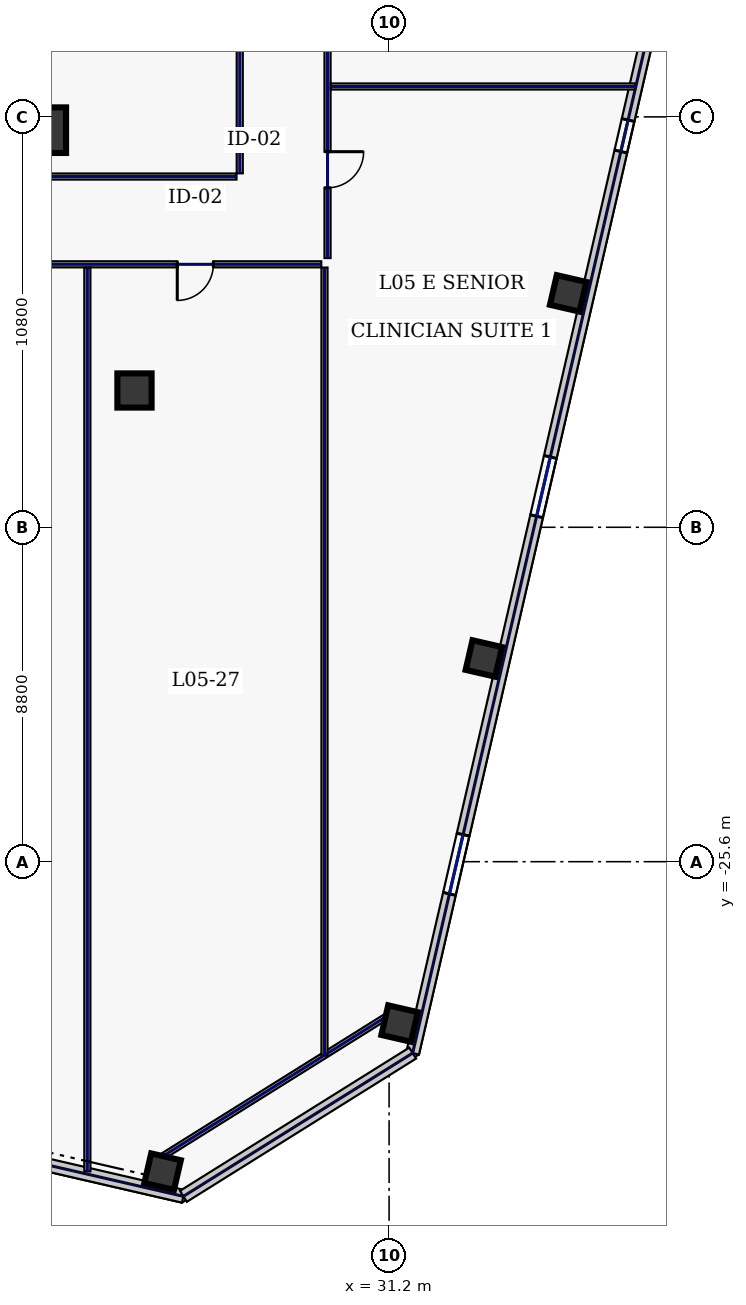
"""IFC4 building model, lengths in metres.
Left out: names, types, materials, properties, quantities, classifications, styles, units other than length and angle.
Written with IfcOpenShell. Run it as: python <this file> out.ifc"""

import sys

from ifc_helpers import new_model, si_unit, direction, frame, frame_2d, origin, origin_2d, place, context, subcontext, project, spatial, rectangle, hollow_rectangle, extrude, element, fill, save


model = new_model("IFC4")
c1 = context("Model", 3, precision=1e-05, world=origin(), true_north=direction((0.0, 1.0)))
c2 = subcontext(c1, "Body", "Model", "MODEL_VIEW")
j1 = project(units=[si_unit("LENGTHUNIT", "METRE"), si_unit("PLANEANGLEUNIT", "RADIAN")], contexts=[c1])
p1 = place(None, origin())
s1 = spatial("IfcSite", under=j1, at=p1, CompositionType="ELEMENT")
p2 = place(p1, origin())
s2 = spatial("IfcBuilding", under=s1, at=p2, CompositionType="ELEMENT")
p3 = place(p2, frame((0.0, 0.0, 28.4)))
s3 = spatial("IfcBuildingStorey", under=s2, at=p3, CompositionType="ELEMENT", Elevation=28.4)
p4 = place(p3, frame((22.1, -6.35, 0.0), z_axis=(0.0, 0.0, 1.0), x_axis=(1.0, 0.0, 0.0)))
e1 = element("IfcColumn", 1, at=p4, inside=s3, PredefinedType="COLUMN", context=c2, shape_type="SweptSolid", body=[
    extrude(hollow_rectangle(XDim=1.2, YDim=1.2, WallThickness=0.05, at=origin_2d()), origin(), (0.0, 0.0, 1.0), 4.68),
])
p5 = place(p3, frame((24.5, -13.2, 0.0), z_axis=(0.0, 0.0, 1.0), x_axis=(1.0, 0.0, 0.0)))
e2 = element("IfcColumn", 2, at=p5, inside=s3, PredefinedType="COLUMN", context=c2, shape_type="SweptSolid", body=[
    extrude(hollow_rectangle(XDim=0.9, YDim=0.9, WallThickness=0.04, at=origin_2d()), origin(), (0.0, 0.0, 1.0), 4.68),
])
for number, where, z_axis, x_axis in (
    (3, (25.24, -33.757, 0.0), (0.0, 0.0, 1.0), (0.974, -0.225, 0.0)),
    (4, (31.476, -29.86, 0.0), (0.0, 0.0, 1.0), (0.974, -0.225, 0.0)),
    (5, (33.694, -20.252, 0.0), (0.0, 0.0, 1.0), (0.974, -0.225, 0.0)),
    (6, (35.912, -10.645, 0.0), (0.0, 0.0, 1.0), (0.974, -0.225, 0.0)),
):
    element("IfcColumn", number, at=place(p3, frame(where, z_axis=z_axis, x_axis=x_axis)), inside=s3, PredefinedType="COLUMN", context=c2, shape_type="SweptSolid", body=[
        extrude(hollow_rectangle(XDim=0.8, YDim=0.8, WallThickness=0.036, at=origin_2d()), origin(), (0.0, 0.0, 1.0), 4.68),
    ])
p6 = place(p3, frame((3.717, -29.311, 0.0), z_axis=(0.0, 0.0, 1.0), x_axis=(0.97436993772, -0.224951604723, 0.0)))
e7 = element("IfcWall", 7, at=p6, inside=s3, PredefinedType="STANDARD", context=c2, shape_type="SweptSolid", body=[
    extrude(rectangle(XDim=22.651, YDim=0.34, at=frame_2d((11.326, 0.0))), origin(), (0.0, 0.0, 1.0), 4.68),
])
p7 = place(p6, frame((3.656, 0.0, 0.85)))
e8 = element("IfcOpeningElement", 8, at=p7, cuts=e7, PredefinedType="OPENING", context=c2, shape_type="SweptSolid", body=[
    extrude(rectangle(XDim=2.9, YDim=2.3, at=frame_2d((1.45, 1.15))), frame((0.0, 0.18, 0.0), z_axis=(0.0, -1.0, 0.0), x_axis=(1.0, 0.0, 0.0)), (0.0, 0.0, 1.0), 0.36),
])
p8 = place(p6, frame((8.791, 0.0, 0.22)))
e9 = element("IfcOpeningElement", 9, at=p8, cuts=e7, PredefinedType="OPENING", context=c2, shape_type="SweptSolid", body=[
    extrude(rectangle(XDim=1.6, YDim=1.2, at=frame_2d((0.8, 0.6))), frame((0.0, 0.18, 0.0), z_axis=(0.0, -1.0, 0.0), x_axis=(1.0, 0.0, 0.0)), (0.0, 0.0, 1.0), 0.36),
])
p9 = place(p6, frame((13.405, 0.0, 0.85)))
e10 = element("IfcOpeningElement", 10, at=p9, cuts=e7, PredefinedType="OPENING", context=c2, shape_type="SweptSolid", body=[
    extrude(rectangle(XDim=2.9, YDim=2.3, at=frame_2d((1.45, 1.15))), frame((0.0, 0.18, 0.0), z_axis=(0.0, -1.0, 0.0), x_axis=(1.0, 0.0, 0.0)), (0.0, 0.0, 1.0), 0.36),
])
p10 = place(p6, frame((17.889, 0.0, 0.85)))
e11 = element("IfcOpeningElement", 11, at=p10, cuts=e7, PredefinedType="OPENING", context=c2, shape_type="SweptSolid", body=[
    extrude(rectangle(XDim=0.85, YDim=1.85, at=frame_2d((0.425, 0.925))), frame((0.0, 0.18, 0.0), z_axis=(0.0, -1.0, 0.0), x_axis=(1.0, 0.0, 0.0)), (0.0, 0.0, 1.0), 0.36),
])
p11 = place(p3, frame((31.82, -30.637, 0.0), z_axis=(0.0, 0.0, 1.0), x_axis=(0.224949969076, 0.974370315338, 0.0)))
e12 = element("IfcWall", 12, at=p11, inside=s3, PredefinedType="STANDARD", context=c2, shape_type="SweptSolid", body=[
    extrude(rectangle(XDim=40.8, YDim=0.34, at=frame_2d((20.4, 0.0))), origin(), (0.0, 0.0, 1.0), 4.68),
])
p12 = place(p11, frame((4.3, 0.0, 0.58)))
e13 = element("IfcOpeningElement", 13, at=p12, cuts=e12, PredefinedType="OPENING", context=c2, shape_type="SweptSolid", body=[
    extrude(rectangle(XDim=1.6, YDim=2.3, at=frame_2d((0.8, 1.15))), frame((0.0, 0.18, 0.0), z_axis=(0.0, -1.0, 0.0), x_axis=(1.0, 0.0, 0.0)), (0.0, 0.0, 1.0), 0.36),
])
p13 = place(p11, frame((14.5, 0.0, 0.58)))
e14 = element("IfcOpeningElement", 14, at=p13, cuts=e12, PredefinedType="OPENING", context=c2, shape_type="SweptSolid", body=[
    extrude(rectangle(XDim=1.6, YDim=2.3, at=frame_2d((0.8, 1.15))), frame((0.0, 0.18, 0.0), z_axis=(0.0, -1.0, 0.0), x_axis=(1.0, 0.0, 0.0)), (0.0, 0.0, 1.0), 0.36),
])
p14 = place(p11, frame((24.35, 0.0, 0.75)))
e15 = element("IfcOpeningElement", 15, at=p14, cuts=e12, PredefinedType="OPENING", context=c2, shape_type="SweptSolid", body=[
    extrude(rectangle(XDim=0.85, YDim=1.85, at=frame_2d((0.425, 0.925))), frame((0.0, 0.18, 0.0), z_axis=(0.0, -1.0, 0.0), x_axis=(1.0, 0.0, 0.0)), (0.0, 0.0, 1.0), 0.36),
])
p15 = place(p11, frame((34.55, 0.0, 0.75)))
e16 = element("IfcOpeningElement", 16, at=p15, cuts=e12, PredefinedType="OPENING", context=c2, shape_type="SweptSolid", body=[
    extrude(rectangle(XDim=0.85, YDim=1.85, at=frame_2d((0.425, 0.925))), frame((0.0, 0.18, 0.0), z_axis=(0.0, -1.0, 0.0), x_axis=(1.0, 0.0, 0.0)), (0.0, 0.0, 1.0), 0.36),
])
p16 = place(p3, frame((25.788, -34.406, 0.0), z_axis=(0.0, 0.0, 1.0), x_axis=(0.848046504656, 0.529921811158, 0.0)))
e17 = element("IfcWall", 17, at=p16, inside=s3, PredefinedType="STANDARD", context=c2, shape_type="SweptSolid", body=[
    extrude(rectangle(XDim=7.113, YDim=0.34, at=frame_2d((3.557, 0.0))), origin(), (0.0, 0.0, 1.0), 4.68),
])
p17 = place(p3, frame((25.06, -33.468, 0.0), z_axis=(0.0, 0.0, 1.0), x_axis=(0.848043064089, 0.529927317139, 0.0)))
e18 = element("IfcWall", 18, at=p17, inside=s3, PredefinedType="PARTITIONING", context=c2, shape_type="SweptSolid", body=[
    extrude(rectangle(XDim=7.354, YDim=0.16, at=frame_2d((3.677, 0.0))), origin(), (0.0, 0.0, 1.0), 4.68),
])
p18 = place(p3, frame((29.58, 9.715, 0.0), z_axis=(0.0, 0.0, 1.0), x_axis=(0.0, -1.0, 0.0)))
e19 = element("IfcWall", 19, at=p18, inside=s3, PredefinedType="PARTITIONING", context=c2, shape_type="SweptSolid", body=[
    extrude(rectangle(XDim=19.43, YDim=0.16, at=frame_2d((9.715, 0.0))), origin(), (0.0, 0.0, 1.0), 4.68),
])
p19 = place(p18, frame((16.631, 0.0, 0.0)))
e20 = element("IfcOpeningElement", 20, at=p19, cuts=e19, PredefinedType="OPENING", context=c2, shape_type="SweptSolid", body=[
    extrude(rectangle(XDim=0.95, YDim=2.2, at=frame_2d((0.475, 1.1))), frame((0.0, 0.09, 0.0), z_axis=(0.0, -1.0, 0.0), x_axis=(1.0, 0.0, 0.0)), (0.0, 0.0, 1.0), 0.18),
])
p20 = place(p18, frame((11.925, 0.0, 0.0)))
e21 = element("IfcOpeningElement", 21, at=p20, cuts=e19, PredefinedType="OPENING", context=c2, shape_type="SweptSolid", body=[
    extrude(rectangle(XDim=0.95, YDim=2.2, at=frame_2d((0.475, 1.1))), frame((0.0, 0.09, 0.0), z_axis=(0.0, -1.0, 0.0), x_axis=(1.0, 0.0, 0.0)), (0.0, 0.0, 1.0), 0.18),
])
p21 = place(p18, frame((6.725, 0.0, 0.0)))
e22 = element("IfcOpeningElement", 22, at=p21, cuts=e19, PredefinedType="OPENING", context=c2, shape_type="SweptSolid", body=[
    extrude(rectangle(XDim=0.95, YDim=2.2, at=frame_2d((0.475, 1.1))), frame((0.0, 0.09, 0.0), z_axis=(0.0, -1.0, 0.0), x_axis=(1.0, 0.0, 0.0)), (0.0, 0.0, 1.0), 0.18),
])
p22 = place(p18, frame((2.019, 0.0, 0.0)))
e23 = element("IfcOpeningElement", 23, at=p22, cuts=e19, PredefinedType="OPENING", context=c2, shape_type="SweptSolid", body=[
    extrude(rectangle(XDim=0.95, YDim=2.2, at=frame_2d((0.475, 1.1))), frame((0.0, 0.09, 0.0), z_axis=(0.0, -1.0, 0.0), x_axis=(1.0, 0.0, 0.0)), (0.0, 0.0, 1.0), 0.18),
])
p23 = place(p3, frame((29.415, -9.88, 0.0), z_axis=(0.0, 0.0, 1.0), x_axis=(-1.0, 0.0, 0.0)))
e24 = element("IfcWall", 24, at=p23, inside=s3, PredefinedType="PARTITIONING", context=c2, shape_type="SweptSolid", body=[
    extrude(rectangle(XDim=22.5, YDim=0.16, at=frame_2d((11.25, 0.0))), origin(), (0.0, 0.0, 1.0), 4.68),
])
p24 = place(p23, frame((15.265, 0.0, 0.0)))
e25 = element("IfcOpeningElement", 25, at=p24, cuts=e24, PredefinedType="OPENING", context=c2, shape_type="SweptSolid", body=[
    extrude(rectangle(XDim=0.95, YDim=2.2, at=frame_2d((0.475, 1.1))), frame((0.0, 0.09, 0.0), z_axis=(0.0, -1.0, 0.0), x_axis=(1.0, 0.0, 0.0)), (0.0, 0.0, 1.0), 0.18),
])
p25 = place(p23, frame((9.335, 0.0, 0.0)))
e26 = element("IfcOpeningElement", 26, at=p25, cuts=e24, PredefinedType="OPENING", context=c2, shape_type="SweptSolid", body=[
    extrude(rectangle(XDim=1.05, YDim=2.2, at=frame_2d((0.525, 1.1))), frame((0.0, 0.09, 0.0), z_axis=(0.0, -1.0, 0.0), x_axis=(1.0, 0.0, 0.0)), (0.0, 0.0, 1.0), 0.18),
])
p26 = place(p23, frame((2.839, 0.0, 0.0)))
e27 = element("IfcOpeningElement", 27, at=p26, cuts=e24, PredefinedType="OPENING", context=c2, shape_type="SweptSolid", body=[
    extrude(rectangle(XDim=0.95, YDim=2.2, at=frame_2d((0.475, 1.1))), frame((0.0, 0.09, 0.0), z_axis=(0.0, -1.0, 0.0), x_axis=(1.0, 0.0, 0.0)), (0.0, 0.0, 1.0), 0.18),
])
p27 = place(p3, frame((10.665, -7.57, 0.0), z_axis=(0.0, 0.0, 1.0), x_axis=(1.0, 0.0, 0.0)))
e28 = element("IfcWall", 28, at=p27, inside=s3, PredefinedType="PARTITIONING", context=c2, shape_type="SweptSolid", body=[
    extrude(rectangle(XDim=16.52, YDim=0.16, at=frame_2d((8.26, 0.0))), origin(), (0.0, 0.0, 1.0), 4.68),
])
p28 = place(p3, frame((27.27, -7.485, 0.0), z_axis=(0.0, 0.0, 1.0), x_axis=(0.0, 1.0, 0.0)))
e29 = element("IfcWall", 29, at=p28, inside=s3, PredefinedType="PARTITIONING", context=c2, shape_type="SweptSolid", body=[
    extrude(rectangle(XDim=14.97, YDim=0.16, at=frame_2d((7.485, 0.0))), origin(), (0.0, 0.0, 1.0), 4.68),
])
p29 = place(p3, frame((29.5, -30.703, 0.0), z_axis=(0.0, 0.0, 1.0), x_axis=(0.0, 1.0, 0.0)))
e30 = element("IfcWall", 30, at=p29, inside=s3, PredefinedType="PARTITIONING", context=c2, shape_type="SweptSolid", body=[
    extrude(rectangle(XDim=20.738, YDim=0.16, at=frame_2d((10.369, 0.0))), origin(), (0.0, 0.0, 1.0), 4.68),
])
p30 = place(p3, frame((23.26, -33.751, 0.0), z_axis=(0.0, 0.0, 1.0), x_axis=(0.0, 1.0, 0.0)))
e31 = element("IfcWall", 31, at=p30, inside=s3, PredefinedType="PARTITIONING", context=c2, shape_type="SweptSolid", body=[
    extrude(rectangle(XDim=23.786, YDim=0.16, at=frame_2d((11.893, 0.0))), origin(), (0.0, 0.0, 1.0), 4.68),
])
p31 = place(p3, frame((29.665, -5.2, 0.0), z_axis=(0.0, 0.0, 1.0), x_axis=(1.0, 0.0, 0.0)))
e32 = element("IfcWall", 32, at=p31, inside=s3, PredefinedType="PARTITIONING", context=c2, shape_type="SweptSolid", body=[
    extrude(rectangle(XDim=8.007, YDim=0.16, at=frame_2d((4.003, 0.0))), origin(), (0.0, 0.0, 1.0), 4.68),
])
p32 = place(p12, origin())
e33 = element("IfcWindow", 33, at=p32, inside=s3, PartitioningType="SINGLE_PANEL", PredefinedType="WINDOW", context=c2, shape_type="SweptSolid", body=[
    extrude(rectangle(XDim=1.6, YDim=2.3, at=frame_2d((0.8, 1.15))), frame((0.0, 0.03, 0.0), z_axis=(0.0, -1.0, 0.0), x_axis=(1.0, 0.0, 0.0)), (0.0, 0.0, 1.0), 0.06),
])
fill(e13, e33)
p33 = place(p13, origin())
e34 = element("IfcWindow", 34, at=p33, inside=s3, PartitioningType="SINGLE_PANEL", PredefinedType="WINDOW", context=c2, shape_type="SweptSolid", body=[
    extrude(rectangle(XDim=1.6, YDim=2.3, at=frame_2d((0.8, 1.15))), frame((0.0, 0.03, 0.0), z_axis=(0.0, -1.0, 0.0), x_axis=(1.0, 0.0, 0.0)), (0.0, 0.0, 1.0), 0.06),
])
fill(e14, e34)
p34 = place(p14, origin())
e35 = element("IfcWindow", 35, at=p34, inside=s3, PartitioningType="SINGLE_PANEL", PredefinedType="WINDOW", context=c2, shape_type="SweptSolid", body=[
    extrude(rectangle(XDim=0.85, YDim=1.85, at=frame_2d((0.425, 0.925))), frame((0.0, 0.03, 0.0), z_axis=(0.0, -1.0, 0.0), x_axis=(1.0, 0.0, 0.0)), (0.0, 0.0, 1.0), 0.06),
])
fill(e15, e35)
p35 = place(p26, origin())
e36 = element("IfcDoor", 36, at=p35, inside=s3, OperationType="SINGLE_SWING_RIGHT", PredefinedType="DOOR", context=c2, shape_type="SweptSolid", body=[
    extrude(rectangle(XDim=0.95, YDim=2.2, at=frame_2d((0.475, 1.1))), frame((0.0, 0.025, 0.0), z_axis=(0.0, -1.0, 0.0), x_axis=(1.0, 0.0, 0.0)), (0.0, 0.0, 1.0), 0.05),
])
fill(e27, e36)
p36 = place(p19, origin())
e37 = element("IfcDoor", 37, at=p36, inside=s3, OperationType="SINGLE_SWING_LEFT", PredefinedType="DOOR", context=c2, shape_type="SweptSolid", body=[
    extrude(rectangle(XDim=0.95, YDim=2.2, at=frame_2d((0.475, 1.1))), frame((0.0, 0.025, 0.0), z_axis=(0.0, -1.0, 0.0), x_axis=(1.0, 0.0, 0.0)), (0.0, 0.0, 1.0), 0.05),
])
fill(e20, e37)
save(model, sys.argv[1])
